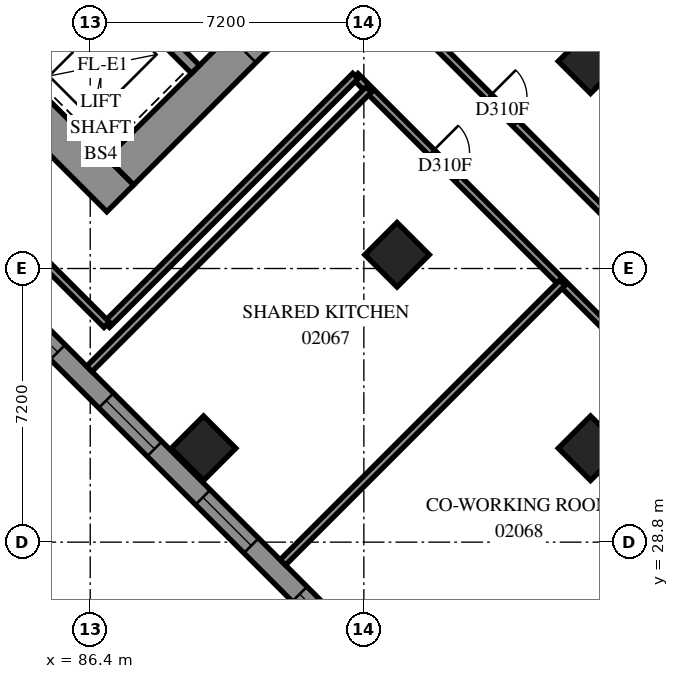
"""IFC4 building model, lengths in metres.
Left out: names, types, materials, properties, quantities, classifications, styles, units other than length and angle.
Written with IfcOpenShell. Run it as: python <this file> out.ifc"""

import sys

from ifc_helpers import new_model, si_unit, direction, frame, frame_2d, origin, origin_2d, place, context, subcontext, project, spatial, polyline, rectangle, outline, extrude, element, fill, save


model = new_model("IFC4")
c1 = context("Model", 3, precision=1e-05, world=origin(), true_north=direction((0.0, 1.0)))
c2 = subcontext(c1, "Body", "Model", "MODEL_VIEW")
j1 = project(units=[si_unit("LENGTHUNIT", "METRE"), si_unit("PLANEANGLEUNIT", "RADIAN")], contexts=[c1])
p1 = place(None, origin())
s1 = spatial("IfcSite", under=j1, at=p1, CompositionType="ELEMENT")
p2 = place(p1, origin())
s2 = spatial("IfcBuilding", under=s1, at=p2, CompositionType="ELEMENT")
p3 = place(p2, frame((0.0, 0.0, 10.2)))
s3 = spatial("IfcBuildingStorey", under=s2, at=p3, CompositionType="ELEMENT", Elevation=10.2)
for number, where, z_axis, x_axis in (
    (1, (99.565, 41.453, 0.0), (0.0, 0.0, 1.0), (0.707, -0.707, 0.0)),
    (2, (94.474, 36.362, 0.0), (0.0, 0.0, 1.0), (0.707, -0.707, 0.0)),
    (3, (89.382, 31.271, 0.0), (0.0, 0.0, 1.0), (0.707, -0.707, 0.0)),
    (4, (99.565, 31.271, 0.0), (0.0, 0.0, 1.0), (0.707, -0.707, 0.0)),
):
    element("IfcColumn", number, at=place(p3, frame(where, z_axis=z_axis, x_axis=x_axis)), inside=s3, PredefinedType="COLUMN", context=c2, shape_type="SweptSolid", body=[
        extrude(rectangle(XDim=1.2, YDim=1.2, at=origin_2d()), origin(), (0.0, 0.0, 1.0), 3.8),
    ])
p4 = place(p3, frame((75.594, 49.443, -0.4), z_axis=(0.0, 0.0, 1.0), x_axis=(0.7071037324, -0.70710983, 0.0)))
e5 = element("IfcWall", 5, at=p4, inside=s3, PredefinedType="SHEAR", context=c2, shape_type="SweptSolid", body=[
    extrude(rectangle(XDim=16.4, YDim=1.0, at=frame_2d((8.2, 0.0))), origin(), (0.0, 0.0, 1.0), 3.5),
])
p5 = place(p3, frame((87.19, 38.554, -0.4), z_axis=(0.0, 0.0, 1.0), x_axis=(0.707103309, 0.7071102534, 0.0)))
e6 = element("IfcWall", 6, at=p5, inside=s3, PredefinedType="SHEAR", context=c2, shape_type="SweptSolid", body=[
    extrude(rectangle(XDim=14.4, YDim=1.0, at=frame_2d((7.2, 0.0))), origin(), (0.0, 0.0, 1.0), 3.5),
])
p6 = place(p5, frame((4.55, 0.0, 0.4)))
e7 = element("IfcOpeningElement", 7, at=p6, cuts=e6, PredefinedType="OPENING", context=c2, shape_type="SweptSolid", body=[
    extrude(rectangle(XDim=1.1, YDim=2.1, at=frame_2d((0.55, 1.05))), frame((0.0, 0.51, 0.0), z_axis=(0.0, -1.0, 0.0), x_axis=(1.0, 0.0, 0.0)), (0.0, 0.0, 1.0), 1.02),
])
p7 = place(p5, frame((11.35, 0.0, 0.4)))
e8 = element("IfcOpeningElement", 8, at=p7, cuts=e6, PredefinedType="OPENING", context=c2, shape_type="SweptSolid", body=[
    extrude(rectangle(XDim=1.1, YDim=2.1, at=frame_2d((0.55, 1.05))), frame((0.0, 0.51, 0.0), z_axis=(0.0, -1.0, 0.0), x_axis=(1.0, 0.0, 0.0)), (0.0, 0.0, 1.0), 1.02),
])
p8 = place(p3, frame((84.291, 41.453, 0.0), z_axis=(0.0, 0.0, 1.0), x_axis=(0.7071067812, 0.7071067812, 0.0)))
e9 = element("IfcWall", 9, at=p8, inside=s3, PredefinedType="SOLIDWALL", context=c2, shape_type="SweptSolid", body=[
    extrude(rectangle(XDim=3.3, YDim=0.3, at=frame_2d((1.65, 0.0))), origin(), (0.0, 0.0, 1.0), 3.8),
])
p9 = place(p3, frame((78.988, 51.423, 0.0), z_axis=(0.0, 0.0, 1.0), x_axis=(0.7071067812, -0.7071067812, 0.0)))
e10 = element("IfcWall", 10, at=p9, inside=s3, PredefinedType="SOLIDWALL", context=c2, shape_type="SweptSolid", body=[
    extrude(rectangle(XDim=14.4, YDim=0.3, at=frame_2d((7.2, 0.0))), origin(), (0.0, 0.0, 1.0), 3.8),
])
p10 = place(p9, frame((1.25, 0.0, 0.0)))
e11 = element("IfcOpeningElement", 11, at=p10, cuts=e10, PredefinedType="OPENING", context=c2, shape_type="SweptSolid", body=[
    extrude(rectangle(XDim=1.1, YDim=2.1, at=frame_2d((0.55, 1.05))), frame((0.0, 0.16, 0.0), z_axis=(0.0, -1.0, 0.0), x_axis=(1.0, 0.0, 0.0)), (0.0, 0.0, 1.0), 0.32),
])
p11 = place(p9, frame((4.85, 0.0, 0.0)))
e12 = element("IfcOpeningElement", 12, at=p11, cuts=e10, PredefinedType="OPENING", context=c2, shape_type="SweptSolid", body=[
    extrude(rectangle(XDim=1.1, YDim=2.1, at=frame_2d((0.55, 1.05))), frame((0.0, 0.16, 0.0), z_axis=(0.0, -1.0, 0.0), x_axis=(1.0, 0.0, 0.0)), (0.0, 0.0, 1.0), 0.32),
])
p12 = place(p9, frame((8.45, 0.0, 0.0)))
e13 = element("IfcOpeningElement", 13, at=p12, cuts=e10, PredefinedType="OPENING", context=c2, shape_type="SweptSolid", body=[
    extrude(rectangle(XDim=1.1, YDim=2.1, at=frame_2d((0.55, 1.05))), frame((0.0, 0.16, 0.0), z_axis=(0.0, -1.0, 0.0), x_axis=(1.0, 0.0, 0.0)), (0.0, 0.0, 1.0), 0.32),
])
p13 = place(p9, frame((12.05, 0.0, 0.0)))
e14 = element("IfcOpeningElement", 14, at=p13, cuts=e10, PredefinedType="OPENING", context=c2, shape_type="SweptSolid", body=[
    extrude(rectangle(XDim=1.1, YDim=2.1, at=frame_2d((0.55, 1.05))), frame((0.0, 0.16, 0.0), z_axis=(0.0, -1.0, 0.0), x_axis=(1.0, 0.0, 0.0)), (0.0, 0.0, 1.0), 0.32),
])
p14 = place(p3, frame((117.843, 34.665, 0.0), z_axis=(0.0, 0.0, 1.0), x_axis=(-0.7071067812, 0.7071067812, 0.0)))
e15 = element("IfcWall", 15, at=p14, inside=s3, PredefinedType="SOLIDWALL", context=c2, shape_type="SweptSolid", body=[
    extrude(outline(polyline([(-0.275, -0.275), (54.222, -0.275), (53.994, 0.275), (0.275, 0.275), (-0.275, -0.275)])), origin(), (0.0, 0.0, 1.0), 3.8),
])
p15 = place(p14, frame((0.8, 0.0, 0.7)))
e16 = element("IfcOpeningElement", 16, at=p15, cuts=e15, PredefinedType="OPENING", context=c2, shape_type="SweptSolid", body=[
    extrude(rectangle(XDim=1.8, YDim=2.6, at=frame_2d((0.9, 1.3))), frame((0.0, 0.285, 0.0), z_axis=(0.0, -1.0, 0.0), x_axis=(1.0, 0.0, 0.0)), (0.0, 0.0, 1.0), 0.57),
])
p16 = place(p14, frame((4.225, 0.0, 0.7)))
e17 = element("IfcOpeningElement", 17, at=p16, cuts=e15, PredefinedType="OPENING", context=c2, shape_type="SweptSolid", body=[
    extrude(rectangle(XDim=1.8, YDim=2.6, at=frame_2d((0.9, 1.3))), frame((0.0, 0.285, 0.0), z_axis=(0.0, -1.0, 0.0), x_axis=(1.0, 0.0, 0.0)), (0.0, 0.0, 1.0), 0.57),
])
p17 = place(p14, frame((7.825, 0.0, 0.7)))
e18 = element("IfcOpeningElement", 18, at=p17, cuts=e15, PredefinedType="OPENING", context=c2, shape_type="SweptSolid", body=[
    extrude(rectangle(XDim=1.8, YDim=2.6, at=frame_2d((0.9, 1.3))), frame((0.0, 0.285, 0.0), z_axis=(0.0, -1.0, 0.0), x_axis=(1.0, 0.0, 0.0)), (0.0, 0.0, 1.0), 0.57),
])
p18 = place(p14, frame((11.425, 0.0, 0.7)))
e19 = element("IfcOpeningElement", 19, at=p18, cuts=e15, PredefinedType="OPENING", context=c2, shape_type="SweptSolid", body=[
    extrude(rectangle(XDim=1.8, YDim=2.6, at=frame_2d((0.9, 1.3))), frame((0.0, 0.285, 0.0), z_axis=(0.0, -1.0, 0.0), x_axis=(1.0, 0.0, 0.0)), (0.0, 0.0, 1.0), 0.57),
])
p19 = place(p14, frame((15.025, 0.0, 0.7)))
e20 = element("IfcOpeningElement", 20, at=p19, cuts=e15, PredefinedType="OPENING", context=c2, shape_type="SweptSolid", body=[
    extrude(rectangle(XDim=1.8, YDim=2.6, at=frame_2d((0.9, 1.3))), frame((0.0, 0.285, 0.0), z_axis=(0.0, -1.0, 0.0), x_axis=(1.0, 0.0, 0.0)), (0.0, 0.0, 1.0), 0.57),
])
p20 = place(p14, frame((18.625, 0.0, 0.7)))
e21 = element("IfcOpeningElement", 21, at=p20, cuts=e15, PredefinedType="OPENING", context=c2, shape_type="SweptSolid", body=[
    extrude(rectangle(XDim=1.8, YDim=2.6, at=frame_2d((0.9, 1.3))), frame((0.0, 0.285, 0.0), z_axis=(0.0, -1.0, 0.0), x_axis=(1.0, 0.0, 0.0)), (0.0, 0.0, 1.0), 0.57),
])
p21 = place(p14, frame((22.225, 0.0, 0.7)))
e22 = element("IfcOpeningElement", 22, at=p21, cuts=e15, PredefinedType="OPENING", context=c2, shape_type="SweptSolid", body=[
    extrude(rectangle(XDim=1.8, YDim=2.6, at=frame_2d((0.9, 1.3))), frame((0.0, 0.285, 0.0), z_axis=(0.0, -1.0, 0.0), x_axis=(1.0, 0.0, 0.0)), (0.0, 0.0, 1.0), 0.57),
])
p22 = place(p14, frame((25.825, 0.0, 0.7)))
e23 = element("IfcOpeningElement", 23, at=p22, cuts=e15, PredefinedType="OPENING", context=c2, shape_type="SweptSolid", body=[
    extrude(rectangle(XDim=1.8, YDim=2.6, at=frame_2d((0.9, 1.3))), frame((0.0, 0.285, 0.0), z_axis=(0.0, -1.0, 0.0), x_axis=(1.0, 0.0, 0.0)), (0.0, 0.0, 1.0), 0.57),
])
p23 = place(p14, frame((29.425, 0.0, 0.7)))
e24 = element("IfcOpeningElement", 24, at=p23, cuts=e15, PredefinedType="OPENING", context=c2, shape_type="SweptSolid", body=[
    extrude(rectangle(XDim=1.8, YDim=2.6, at=frame_2d((0.9, 1.3))), frame((0.0, 0.285, 0.0), z_axis=(0.0, -1.0, 0.0), x_axis=(1.0, 0.0, 0.0)), (0.0, 0.0, 1.0), 0.57),
])
p24 = place(p14, frame((33.025, 0.0, 0.7)))
e25 = element("IfcOpeningElement", 25, at=p24, cuts=e15, PredefinedType="OPENING", context=c2, shape_type="SweptSolid", body=[
    extrude(rectangle(XDim=1.8, YDim=2.6, at=frame_2d((0.9, 1.3))), frame((0.0, 0.285, 0.0), z_axis=(0.0, -1.0, 0.0), x_axis=(1.0, 0.0, 0.0)), (0.0, 0.0, 1.0), 0.57),
])
p25 = place(p14, frame((36.625, 0.0, 0.7)))
e26 = element("IfcOpeningElement", 26, at=p25, cuts=e15, PredefinedType="OPENING", context=c2, shape_type="SweptSolid", body=[
    extrude(rectangle(XDim=1.8, YDim=2.6, at=frame_2d((0.9, 1.3))), frame((0.0, 0.285, 0.0), z_axis=(0.0, -1.0, 0.0), x_axis=(1.0, 0.0, 0.0)), (0.0, 0.0, 1.0), 0.57),
])
p26 = place(p14, frame((40.225, 0.0, 0.7)))
e27 = element("IfcOpeningElement", 27, at=p26, cuts=e15, PredefinedType="OPENING", context=c2, shape_type="SweptSolid", body=[
    extrude(rectangle(XDim=1.8, YDim=2.6, at=frame_2d((0.9, 1.3))), frame((0.0, 0.285, 0.0), z_axis=(0.0, -1.0, 0.0), x_axis=(1.0, 0.0, 0.0)), (0.0, 0.0, 1.0), 0.57),
])
p27 = place(p14, frame((43.825, 0.0, 0.7)))
e28 = element("IfcOpeningElement", 28, at=p27, cuts=e15, PredefinedType="OPENING", context=c2, shape_type="SweptSolid", body=[
    extrude(rectangle(XDim=1.8, YDim=2.6, at=frame_2d((0.9, 1.3))), frame((0.0, 0.285, 0.0), z_axis=(0.0, -1.0, 0.0), x_axis=(1.0, 0.0, 0.0)), (0.0, 0.0, 1.0), 0.57),
])
p28 = place(p14, frame((47.425, 0.0, 0.7)))
e29 = element("IfcOpeningElement", 29, at=p28, cuts=e15, PredefinedType="OPENING", context=c2, shape_type="SweptSolid", body=[
    extrude(rectangle(XDim=1.8, YDim=2.6, at=frame_2d((0.9, 1.3))), frame((0.0, 0.285, 0.0), z_axis=(0.0, -1.0, 0.0), x_axis=(1.0, 0.0, 0.0)), (0.0, 0.0, 1.0), 0.57),
])
p29 = place(p14, frame((50.96, 0.0, 0.7)))
e30 = element("IfcOpeningElement", 30, at=p29, cuts=e15, PredefinedType="OPENING", context=c2, shape_type="SweptSolid", body=[
    extrude(rectangle(XDim=1.8, YDim=2.6, at=frame_2d((0.9, 1.3))), frame((0.0, 0.285, 0.0), z_axis=(0.0, -1.0, 0.0), x_axis=(1.0, 0.0, 0.0)), (0.0, 0.0, 1.0), 0.57),
])
p30 = place(p3, frame((77.07, 42.275, 0.0), z_axis=(0.0, 0.0, 1.0), x_axis=(0.7071067812, -0.7071067812, 0.0)))
e31 = element("IfcWall", 31, at=p30, inside=s3, PredefinedType="SOLIDWALL", context=c2, shape_type="SweptSolid", body=[
    extrude(outline(polyline([(0.114, -0.275), (39.288, -0.275), (38.737, 0.275), (-0.114, 0.275), (0.114, -0.275)])), origin(), (0.0, 0.0, 1.0), 3.8),
])
p31 = place(p30, frame((2.837, 0.0, 0.7)))
e32 = element("IfcOpeningElement", 32, at=p31, cuts=e31, PredefinedType="OPENING", context=c2, shape_type="SweptSolid", body=[
    extrude(rectangle(XDim=1.8, YDim=2.6, at=frame_2d((0.9, 1.3))), frame((0.0, 0.285, 0.0), z_axis=(0.0, -1.0, 0.0), x_axis=(1.0, 0.0, 0.0)), (0.0, 0.0, 1.0), 0.57),
])
p32 = place(p30, frame((6.588, 0.0, 0.7)))
e33 = element("IfcOpeningElement", 33, at=p32, cuts=e31, PredefinedType="OPENING", context=c2, shape_type="SweptSolid", body=[
    extrude(rectangle(XDim=1.8, YDim=2.6, at=frame_2d((0.9, 1.3))), frame((0.0, 0.285, 0.0), z_axis=(0.0, -1.0, 0.0), x_axis=(1.0, 0.0, 0.0)), (0.0, 0.0, 1.0), 0.57),
])
p33 = place(p30, frame((10.188, 0.0, 0.7)))
e34 = element("IfcOpeningElement", 34, at=p33, cuts=e31, PredefinedType="OPENING", context=c2, shape_type="SweptSolid", body=[
    extrude(rectangle(XDim=1.8, YDim=2.6, at=frame_2d((0.9, 1.3))), frame((0.0, 0.285, 0.0), z_axis=(0.0, -1.0, 0.0), x_axis=(1.0, 0.0, 0.0)), (0.0, 0.0, 1.0), 0.57),
])
p34 = place(p30, frame((13.787, 0.0, 0.7)))
e35 = element("IfcOpeningElement", 35, at=p34, cuts=e31, PredefinedType="OPENING", context=c2, shape_type="SweptSolid", body=[
    extrude(rectangle(XDim=1.8, YDim=2.6, at=frame_2d((0.9, 1.3))), frame((0.0, 0.285, 0.0), z_axis=(0.0, -1.0, 0.0), x_axis=(1.0, 0.0, 0.0)), (0.0, 0.0, 1.0), 0.57),
])
p35 = place(p30, frame((17.387, 0.0, 0.7)))
e36 = element("IfcOpeningElement", 36, at=p35, cuts=e31, PredefinedType="OPENING", context=c2, shape_type="SweptSolid", body=[
    extrude(rectangle(XDim=1.8, YDim=2.6, at=frame_2d((0.9, 1.3))), frame((0.0, 0.285, 0.0), z_axis=(0.0, -1.0, 0.0), x_axis=(1.0, 0.0, 0.0)), (0.0, 0.0, 1.0), 0.57),
])
p36 = place(p30, frame((20.988, 0.0, 0.7)))
e37 = element("IfcOpeningElement", 37, at=p36, cuts=e31, PredefinedType="OPENING", context=c2, shape_type="SweptSolid", body=[
    extrude(rectangle(XDim=1.8, YDim=2.6, at=frame_2d((0.9, 1.3))), frame((0.0, 0.285, 0.0), z_axis=(0.0, -1.0, 0.0), x_axis=(1.0, 0.0, 0.0)), (0.0, 0.0, 1.0), 0.57),
])
p37 = place(p30, frame((24.587, 0.0, 0.7)))
e38 = element("IfcOpeningElement", 38, at=p37, cuts=e31, PredefinedType="OPENING", context=c2, shape_type="SweptSolid", body=[
    extrude(rectangle(XDim=1.8, YDim=2.6, at=frame_2d((0.9, 1.3))), frame((0.0, 0.285, 0.0), z_axis=(0.0, -1.0, 0.0), x_axis=(1.0, 0.0, 0.0)), (0.0, 0.0, 1.0), 0.57),
])
p38 = place(p30, frame((28.188, 0.0, 0.7)))
e39 = element("IfcOpeningElement", 39, at=p38, cuts=e31, PredefinedType="OPENING", context=c2, shape_type="SweptSolid", body=[
    extrude(rectangle(XDim=1.8, YDim=2.6, at=frame_2d((0.9, 1.3))), frame((0.0, 0.285, 0.0), z_axis=(0.0, -1.0, 0.0), x_axis=(1.0, 0.0, 0.0)), (0.0, 0.0, 1.0), 0.57),
])
p39 = place(p30, frame((31.788, 0.0, 0.7)))
e40 = element("IfcOpeningElement", 40, at=p39, cuts=e31, PredefinedType="OPENING", context=c2, shape_type="SweptSolid", body=[
    extrude(rectangle(XDim=1.8, YDim=2.6, at=frame_2d((0.9, 1.3))), frame((0.0, 0.285, 0.0), z_axis=(0.0, -1.0, 0.0), x_axis=(1.0, 0.0, 0.0)), (0.0, 0.0, 1.0), 0.57),
])
p40 = place(p30, frame((35.388, 0.0, 0.7)))
e41 = element("IfcOpeningElement", 41, at=p40, cuts=e31, PredefinedType="OPENING", context=c2, shape_type="SweptSolid", body=[
    extrude(rectangle(XDim=1.8, YDim=2.6, at=frame_2d((0.9, 1.3))), frame((0.0, 0.285, 0.0), z_axis=(0.0, -1.0, 0.0), x_axis=(1.0, 0.0, 0.0)), (0.0, 0.0, 1.0), 0.57),
])
p41 = place(p3, frame((94.861, 42.544, 0.0), z_axis=(0.0, 0.0, 1.0), x_axis=(0.7071067812, -0.7071067812, 0.0)))
e42 = element("IfcWall", 42, at=p41, inside=s3, PredefinedType="PARTITIONING", context=c2, shape_type="SweptSolid", body=[
    extrude(rectangle(XDim=25.699, YDim=0.2, at=frame_2d((12.85, 0.0))), origin(), (0.0, 0.0, 1.0), 3.8),
])
p42 = place(p41, frame((10.072, 0.0, 0.0)))
e43 = element("IfcOpeningElement", 43, at=p42, cuts=e42, PredefinedType="OPENING", context=c2, shape_type="SweptSolid", body=[
    extrude(rectangle(XDim=1.0, YDim=2.1, at=frame_2d((0.5, 1.05))), frame((0.0, 0.11, 0.0), z_axis=(0.0, -1.0, 0.0), x_axis=(1.0, 0.0, 0.0)), (0.0, 0.0, 1.0), 0.22),
])
p43 = place(p41, frame((2.872, 0.0, 0.0)))
e44 = element("IfcOpeningElement", 44, at=p43, cuts=e42, PredefinedType="OPENING", context=c2, shape_type="SweptSolid", body=[
    extrude(rectangle(XDim=1.0, YDim=2.1, at=frame_2d((0.5, 1.05))), frame((0.0, 0.11, 0.0), z_axis=(0.0, -1.0, 0.0), x_axis=(1.0, 0.0, 0.0)), (0.0, 0.0, 1.0), 0.22),
])
p44 = place(p41, frame((17.272, 0.0, 0.0)))
e45 = element("IfcOpeningElement", 45, at=p44, cuts=e42, PredefinedType="OPENING", context=c2, shape_type="SweptSolid", body=[
    extrude(rectangle(XDim=1.0, YDim=2.1, at=frame_2d((0.5, 1.05))), frame((0.0, 0.11, 0.0), z_axis=(0.0, -1.0, 0.0), x_axis=(1.0, 0.0, 0.0)), (0.0, 0.0, 1.0), 0.22),
])
p45 = place(p41, frame((22.606, 0.0, 0.0)))
e46 = element("IfcOpeningElement", 46, at=p45, cuts=e42, PredefinedType="OPENING", context=c2, shape_type="SweptSolid", body=[
    extrude(rectangle(XDim=1.0, YDim=2.1, at=frame_2d((0.5, 1.05))), frame((0.0, 0.11, 0.0), z_axis=(0.0, -1.0, 0.0), x_axis=(1.0, 0.0, 0.0)), (0.0, 0.0, 1.0), 0.22),
])
p46 = place(p3, frame((93.375, 41.061, 0.0), z_axis=(0.0, 0.0, 1.0), x_axis=(0.7071067812, -0.7071067812, 0.0)))
e47 = element("IfcWall", 47, at=p46, inside=s3, PredefinedType="PARTITIONING", context=c2, shape_type="SweptSolid", body=[
    extrude(rectangle(XDim=25.699, YDim=0.2, at=frame_2d((12.85, 0.0))), origin(), (0.0, 0.0, 1.0), 3.8),
])
p47 = place(p46, frame((2.837, 0.0, 0.0)))
e48 = element("IfcOpeningElement", 48, at=p47, cuts=e47, PredefinedType="OPENING", context=c2, shape_type="SweptSolid", body=[
    extrude(rectangle(XDim=1.0, YDim=2.1, at=frame_2d((0.5, 1.05))), frame((0.0, 0.11, 0.0), z_axis=(0.0, -1.0, 0.0), x_axis=(1.0, 0.0, 0.0)), (0.0, 0.0, 1.0), 0.22),
])
p48 = place(p46, frame((10.037, 0.0, 0.0)))
e49 = element("IfcOpeningElement", 49, at=p48, cuts=e47, PredefinedType="OPENING", context=c2, shape_type="SweptSolid", body=[
    extrude(rectangle(XDim=1.0, YDim=2.1, at=frame_2d((0.5, 1.05))), frame((0.0, 0.11, 0.0), z_axis=(0.0, -1.0, 0.0), x_axis=(1.0, 0.0, 0.0)), (0.0, 0.0, 1.0), 0.22),
])
p49 = place(p46, frame((15.425, 0.0, 0.0)))
e50 = element("IfcOpeningElement", 50, at=p49, cuts=e47, PredefinedType="OPENING", context=c2, shape_type="SweptSolid", body=[
    extrude(rectangle(XDim=1.0, YDim=2.1, at=frame_2d((0.5, 1.05))), frame((0.0, 0.11, 0.0), z_axis=(0.0, -1.0, 0.0), x_axis=(1.0, 0.0, 0.0)), (0.0, 0.0, 1.0), 0.22),
])
p50 = place(p46, frame((22.057, 0.0, 0.0)))
e51 = element("IfcOpeningElement", 51, at=p50, cuts=e47, PredefinedType="OPENING", context=c2, shape_type="SweptSolid", body=[
    extrude(rectangle(XDim=1.0, YDim=2.1, at=frame_2d((0.5, 1.05))), frame((0.0, 0.11, 0.0), z_axis=(0.0, -1.0, 0.0), x_axis=(1.0, 0.0, 0.0)), (0.0, 0.0, 1.0), 0.22),
])
for number, where, z_axis, x_axis in (
    (52, (86.376, 33.357, 0.0), (0.0, 0.0, 1.0), (0.707, 0.707, 0.0)),
    (53, (91.468, 28.266, 0.0), (0.0, 0.0, 1.0), (0.707, 0.707, 0.0)),
    (54, (96.559, 23.175, 0.0), (0.0, 0.0, 1.0), (0.707, 0.707, 0.0)),
):
    element("IfcWall", number, at=place(p3, frame(where, z_axis=z_axis, x_axis=x_axis)), inside=s3, PredefinedType="PARTITIONING", context=c2, shape_type="SweptSolid", body=[
        extrude(rectangle(XDim=10.4, YDim=0.2, at=frame_2d((5.2, 0.0))), origin(), (0.0, 0.0, 1.0), 3.8),
    ])
p51 = place(p3, frame((86.836, 34.524, 0.0), z_axis=(0.0, 0.0, 1.0), x_axis=(0.7071067812, 0.7071067812, 0.0)))
e55 = element("IfcWall", 55, at=p51, inside=s3, PredefinedType="PARTITIONING", context=c2, shape_type="SweptSolid", body=[
    extrude(rectangle(XDim=9.249, YDim=0.2, at=frame_2d((4.625, 0.0))), origin(), (0.0, 0.0, 1.0), 3.8),
])
p52 = place(p3, frame((84.889, 36.465, 0.0), z_axis=(0.0, 0.0, 1.0), x_axis=(0.7071067812, -0.7071067812, 0.0)))
e56 = element("IfcWall", 56, at=p52, inside=s3, PredefinedType="PARTITIONING", context=c2, shape_type="SweptSolid", body=[
    extrude(rectangle(XDim=2.749, YDim=0.2, at=frame_2d((1.375, 0.0))), origin(), (0.0, 0.0, 1.0), 3.8),
])
p53 = place(p33, origin())
e57 = element("IfcWindow", 57, at=p53, inside=s3, PartitioningType="SINGLE_PANEL", PredefinedType="WINDOW", context=c2, shape_type="SweptSolid", body=[
    extrude(rectangle(XDim=1.8, YDim=2.6, at=frame_2d((0.9, 1.3))), frame((0.0, 0.155, 0.0), z_axis=(0.0, -1.0, 0.0), x_axis=(1.0, 0.0, 0.0)), (0.0, 0.0, 1.0), 0.06),
])
fill(e34, e57)
p54 = place(p34, origin())
e58 = element("IfcWindow", 58, at=p54, inside=s3, PartitioningType="SINGLE_PANEL", PredefinedType="WINDOW", context=c2, shape_type="SweptSolid", body=[
    extrude(rectangle(XDim=1.8, YDim=2.6, at=frame_2d((0.9, 1.3))), frame((0.0, 0.155, 0.0), z_axis=(0.0, -1.0, 0.0), x_axis=(1.0, 0.0, 0.0)), (0.0, 0.0, 1.0), 0.06),
])
fill(e35, e58)
p55 = place(p35, origin())
e59 = element("IfcWindow", 59, at=p55, inside=s3, PartitioningType="SINGLE_PANEL", PredefinedType="WINDOW", context=c2, shape_type="SweptSolid", body=[
    extrude(rectangle(XDim=1.8, YDim=2.6, at=frame_2d((0.9, 1.3))), frame((0.0, 0.155, 0.0), z_axis=(0.0, -1.0, 0.0), x_axis=(1.0, 0.0, 0.0)), (0.0, 0.0, 1.0), 0.06),
])
fill(e36, e59)
p56 = place(p36, origin())
e60 = element("IfcWindow", 60, at=p56, inside=s3, PartitioningType="SINGLE_PANEL", PredefinedType="WINDOW", context=c2, shape_type="SweptSolid", body=[
    extrude(rectangle(XDim=1.8, YDim=2.6, at=frame_2d((0.9, 1.3))), frame((0.0, 0.155, 0.0), z_axis=(0.0, -1.0, 0.0), x_axis=(1.0, 0.0, 0.0)), (0.0, 0.0, 1.0), 0.06),
])
fill(e37, e60)
p57 = place(p47, origin())
e61 = element("IfcDoor", 61, at=p57, inside=s3, OperationType="SINGLE_SWING_LEFT", PredefinedType="DOOR", context=c2, shape_type="SweptSolid", body=[
    extrude(rectangle(XDim=1.0, YDim=2.1, at=frame_2d((0.5, 1.05))), frame((0.0, 0.025, 0.0), z_axis=(0.0, -1.0, 0.0), x_axis=(1.0, 0.0, 0.0)), (0.0, 0.0, 1.0), 0.05),
])
fill(e48, e61)
p58 = place(p43, origin())
e62 = element("IfcDoor", 62, at=p58, inside=s3, OperationType="SINGLE_SWING_RIGHT", PredefinedType="DOOR", context=c2, shape_type="SweptSolid", body=[
    extrude(rectangle(XDim=1.0, YDim=2.1, at=frame_2d((0.5, 1.05))), frame((0.0, 0.025, 0.0), z_axis=(0.0, -1.0, 0.0), x_axis=(1.0, 0.0, 0.0)), (0.0, 0.0, 1.0), 0.05),
])
fill(e44, e62)
save(model, sys.argv[1])
